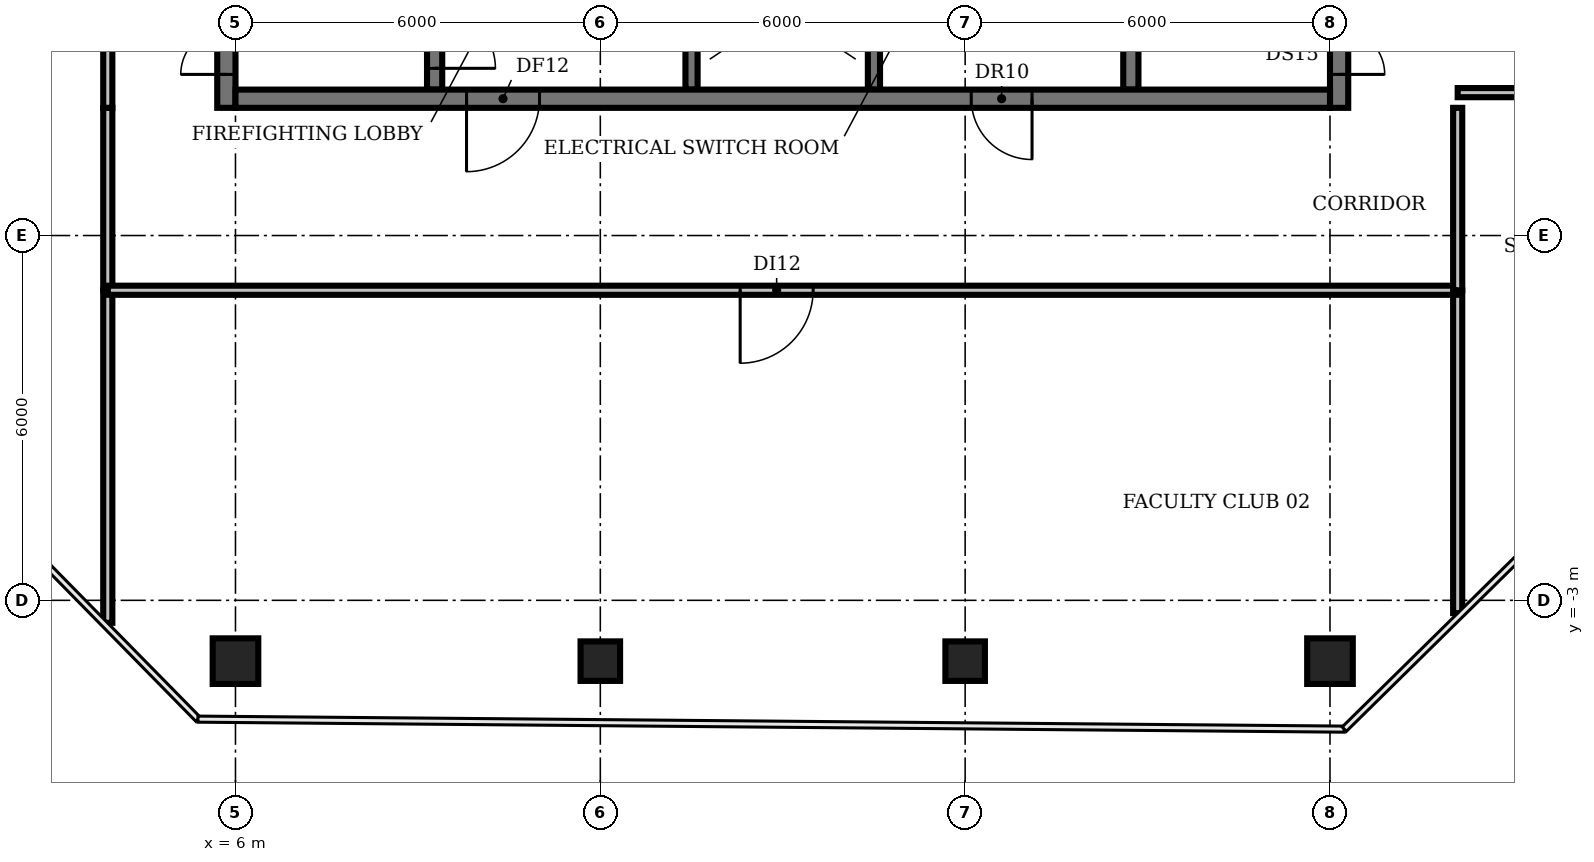
"""IFC4 building model, lengths in metres.
Left out: names, types, materials, properties, quantities, classifications, styles, units other than length and angle.
Written with IfcOpenShell. Run it as: python <this file> out.ifc"""

import sys

from ifc_helpers import new_model, si_unit, direction, frame, frame_2d, origin, origin_2d, place, context, subcontext, project, spatial, rectangle, circle, extrude, element, fill, save


model = new_model("IFC4")
c1 = context("Model", 3, precision=1e-05, world=origin(), true_north=direction((0.0, 1.0)))
c2 = subcontext(c1, "Body", "Model", "MODEL_VIEW")
j1 = project(units=[si_unit("LENGTHUNIT", "METRE"), si_unit("PLANEANGLEUNIT", "RADIAN")], contexts=[c1])
p1 = place(None, origin())
s1 = spatial("IfcSite", under=j1, at=p1, CompositionType="ELEMENT")
p2 = place(p1, origin())
s2 = spatial("IfcBuilding", under=s1, at=p2, CompositionType="ELEMENT")
p3 = place(p2, frame((0.0, 0.0, 335.6)))
s3 = spatial("IfcBuildingStorey", under=s2, at=p3, CompositionType="ELEMENT", Elevation=335.6)
p4 = place(p3, frame((6.0, -4.0, 0.0), z_axis=(0.0, 0.0, 1.0), x_axis=(1.0, 0.0, 0.0)))
e1 = element("IfcColumn", 1, at=p4, inside=s3, PredefinedType="COLUMN", context=c2, shape_type="SweptSolid", body=[
    extrude(circle(Radius=0.375, at=origin_2d()), origin(), (0.0, 0.0, 1.0), 3.9),
])
for number, where, z_axis, x_axis in (
    (2, (12.0, -4.0, 0.0), (0.0, 0.0, 1.0), (1.0, 0.0, 0.0)),
    (3, (18.0, -4.0, 0.0), (0.0, 0.0, 1.0), (1.0, 0.0, 0.0)),
):
    element("IfcColumn", number, at=place(p3, frame(where, z_axis=z_axis, x_axis=x_axis)), inside=s3, PredefinedType="COLUMN", context=c2, shape_type="SweptSolid", body=[
        extrude(rectangle(XDim=0.65, YDim=0.65, at=origin_2d()), origin(), (0.0, 0.0, 1.0), 3.9),
    ])
p5 = place(p3, frame((24.0, -4.0, 0.0), z_axis=(0.0, 0.0, 1.0), x_axis=(1.0, 0.0, 0.0)))
e4 = element("IfcColumn", 4, at=p5, inside=s3, PredefinedType="COLUMN", context=c2, shape_type="SweptSolid", body=[
    extrude(circle(Radius=0.375, at=origin_2d()), origin(), (0.0, 0.0, 1.0), 3.9),
])
p6 = place(p3, frame((9.275, 11.825, 0.0), z_axis=(0.0, 0.0, 1.0), x_axis=(0.0, -1.0, 0.0)))
e5 = element("IfcWall", 5, at=p6, inside=s3, PredefinedType="SHEAR", context=c2, shape_type="SweptSolid", body=[
    extrude(rectangle(XDim=6.425, YDim=0.25, at=frame_2d((3.212, 0.0))), origin(), (0.0, 0.0, 1.0), 3.9),
])
p7 = place(p6, frame((5.075, 0.0, 0.0)))
e6 = element("IfcOpeningElement", 6, at=p7, cuts=e5, PredefinedType="OPENING", context=c2, shape_type="SweptSolid", body=[
    extrude(rectangle(XDim=1.0, YDim=2.1, at=frame_2d((0.5, 1.05))), frame((0.0, 0.135, 0.0), z_axis=(0.0, -1.0, 0.0), x_axis=(1.0, 0.0, 0.0)), (0.0, 0.0, 1.0), 0.27),
])
p8 = place(p3, frame((13.5, 5.4, 0.0), z_axis=(0.0, 0.0, 1.0), x_axis=(0.0, 1.0, 0.0)))
e7 = element("IfcWall", 7, at=p8, inside=s3, PredefinedType="SHEAR", context=c2, shape_type="SweptSolid", body=[
    extrude(rectangle(XDim=8.2, YDim=0.2, at=frame_2d((4.1, 0.0))), origin(), (0.0, 0.0, 1.0), 3.9),
])
p9 = place(p8, frame((0.75, 0.0, 0.0)))
e8 = element("IfcOpeningElement", 8, at=p9, cuts=e7, PredefinedType="OPENING", context=c2, shape_type="SweptSolid", body=[
    extrude(rectangle(XDim=1.1, YDim=2.1, at=frame_2d((0.55, 1.05))), frame((0.0, 0.11, 0.0), z_axis=(0.0, -1.0, 0.0), x_axis=(1.0, 0.0, 0.0)), (0.0, 0.0, 1.0), 0.22),
])
p10 = place(p8, frame((3.55, 0.0, 0.0)))
e9 = element("IfcOpeningElement", 9, at=p10, cuts=e7, PredefinedType="OPENING", context=c2, shape_type="SweptSolid", body=[
    extrude(rectangle(XDim=1.1, YDim=2.1, at=frame_2d((0.55, 1.05))), frame((0.0, 0.11, 0.0), z_axis=(0.0, -1.0, 0.0), x_axis=(1.0, 0.0, 0.0)), (0.0, 0.0, 1.0), 0.22),
])
p11 = place(p8, frame((6.35, 0.0, 0.0)))
e10 = element("IfcOpeningElement", 10, at=p11, cuts=e7, PredefinedType="OPENING", context=c2, shape_type="SweptSolid", body=[
    extrude(rectangle(XDim=1.1, YDim=2.1, at=frame_2d((0.55, 1.05))), frame((0.0, 0.11, 0.0), z_axis=(0.0, -1.0, 0.0), x_axis=(1.0, 0.0, 0.0)), (0.0, 0.0, 1.0), 0.22),
])
p12 = place(p3, frame((16.5, 5.4, 0.0), z_axis=(0.0, 0.0, 1.0), x_axis=(0.0, 1.0, 0.0)))
e11 = element("IfcWall", 11, at=p12, inside=s3, PredefinedType="SHEAR", context=c2, shape_type="SweptSolid", body=[
    extrude(rectangle(XDim=8.2, YDim=0.2, at=frame_2d((4.1, 0.0))), origin(), (0.0, 0.0, 1.0), 3.9),
])
p13 = place(p3, frame((20.725, 5.4, 0.0), z_axis=(0.0, 0.0, 1.0), x_axis=(0.0, 1.0, 0.0)))
e12 = element("IfcWall", 12, at=p13, inside=s3, PredefinedType="SHEAR", context=c2, shape_type="SweptSolid", body=[
    extrude(rectangle(XDim=8.2, YDim=0.25, at=frame_2d((4.1, 0.0))), origin(), (0.0, 0.0, 1.0), 3.9),
])
p14 = place(p3, frame((5.85, 5.1, 0.0), z_axis=(0.0, 0.0, 1.0), x_axis=(0.0, 1.0, 0.0)))
e13 = element("IfcWall", 13, at=p14, inside=s3, PredefinedType="SHEAR", context=c2, shape_type="SweptSolid", body=[
    extrude(rectangle(XDim=20.0, YDim=0.3, at=frame_2d((10.0, 0.0))), origin(), (0.0, 0.0, 1.0), 3.9),
])
p15 = place(p14, frame((0.55, 0.0, 0.0)))
e14 = element("IfcOpeningElement", 14, at=p15, cuts=e13, PredefinedType="OPENING", context=c2, shape_type="SweptSolid", body=[
    extrude(rectangle(XDim=1.5, YDim=2.1, at=frame_2d((0.75, 1.05))), frame((0.0, 0.16, 0.0), z_axis=(0.0, -1.0, 0.0), x_axis=(1.0, 0.0, 0.0)), (0.0, 0.0, 1.0), 0.32),
])
p16 = place(p14, frame((7.0, 0.0, 0.0)))
e15 = element("IfcOpeningElement", 15, at=p16, cuts=e13, PredefinedType="OPENING", context=c2, shape_type="SweptSolid", body=[
    extrude(rectangle(XDim=1.2, YDim=2.1, at=frame_2d((0.6, 1.05))), frame((0.0, 0.16, 0.0), z_axis=(0.0, -1.0, 0.0), x_axis=(1.0, 0.0, 0.0)), (0.0, 0.0, 1.0), 0.32),
])
p17 = place(p14, frame((13.55, 0.0, 0.0)))
e16 = element("IfcOpeningElement", 16, at=p17, cuts=e13, PredefinedType="OPENING", context=c2, shape_type="SweptSolid", body=[
    extrude(rectangle(XDim=1.2, YDim=2.1, at=frame_2d((0.6, 1.05))), frame((0.0, 0.16, 0.0), z_axis=(0.0, -1.0, 0.0), x_axis=(1.0, 0.0, 0.0)), (0.0, 0.0, 1.0), 0.32),
])
p18 = place(p3, frame((24.15, 25.705, 0.0), z_axis=(0.0, 0.0, 1.0), x_axis=(0.0, -1.0, 0.0)))
e17 = element("IfcWall", 17, at=p18, inside=s3, PredefinedType="SHEAR", context=c2, shape_type="SweptSolid", body=[
    extrude(rectangle(XDim=20.605, YDim=0.3, at=frame_2d((10.302, 0.0))), origin(), (0.0, 0.0, 1.0), 3.9),
])
p19 = place(p18, frame((18.555, 0.0, 0.0)))
e18 = element("IfcOpeningElement", 18, at=p19, cuts=e17, PredefinedType="OPENING", context=c2, shape_type="SweptSolid", body=[
    extrude(rectangle(XDim=1.5, YDim=2.1, at=frame_2d((0.75, 1.05))), frame((0.0, 0.16, 0.0), z_axis=(0.0, -1.0, 0.0), x_axis=(1.0, 0.0, 0.0)), (0.0, 0.0, 1.0), 0.32),
])
p20 = place(p18, frame((12.455, 0.0, 0.0)))
e19 = element("IfcOpeningElement", 19, at=p20, cuts=e17, PredefinedType="OPENING", context=c2, shape_type="SweptSolid", body=[
    extrude(rectangle(XDim=0.9, YDim=2.1, at=frame_2d((0.45, 1.05))), frame((0.0, 0.16, 0.0), z_axis=(0.0, -1.0, 0.0), x_axis=(1.0, 0.0, 0.0)), (0.0, 0.0, 1.0), 0.32),
])
p21 = place(p18, frame((6.455, 0.0, 0.0)))
e20 = element("IfcOpeningElement", 20, at=p21, cuts=e17, PredefinedType="OPENING", context=c2, shape_type="SweptSolid", body=[
    extrude(rectangle(XDim=2.0, YDim=2.1, at=frame_2d((1.0, 1.05))), frame((0.0, 0.16, 0.0), z_axis=(0.0, -1.0, 0.0), x_axis=(1.0, 0.0, 0.0)), (0.0, 0.0, 1.0), 0.32),
])
p22 = place(p3, frame((24.0, 5.25, 0.0), z_axis=(0.0, 0.0, 1.0), x_axis=(-1.0, 0.0, 0.0)))
e21 = element("IfcWall", 21, at=p22, inside=s3, PredefinedType="SHEAR", context=c2, shape_type="SweptSolid", body=[
    extrude(rectangle(XDim=18.0, YDim=0.3, at=frame_2d((9.0, 0.0))), origin(), (0.0, 0.0, 1.0), 3.9),
])
p23 = place(p22, frame((13.0, 0.0, 0.0)))
e22 = element("IfcOpeningElement", 22, at=p23, cuts=e21, PredefinedType="OPENING", context=c2, shape_type="SweptSolid", body=[
    extrude(rectangle(XDim=1.2, YDim=2.1, at=frame_2d((0.6, 1.05))), frame((0.0, 0.16, 0.0), z_axis=(0.0, -1.0, 0.0), x_axis=(1.0, 0.0, 0.0)), (0.0, 0.0, 1.0), 0.32),
])
p24 = place(p22, frame((4.9, 0.0, 0.0)))
e23 = element("IfcOpeningElement", 23, at=p24, cuts=e21, PredefinedType="OPENING", context=c2, shape_type="SweptSolid", body=[
    extrude(rectangle(XDim=1.0, YDim=2.1, at=frame_2d((0.5, 1.05))), frame((0.0, 0.16, 0.0), z_axis=(0.0, -1.0, 0.0), x_axis=(1.0, 0.0, 0.0)), (0.0, 0.0, 1.0), 0.32),
])
p25 = place(p3, frame((3.9, -3.37, 0.0), z_axis=(0.0, 0.0, 1.0), x_axis=(0.0, 1.0, 0.0)))
e24 = element("IfcWall", 24, at=p25, inside=s3, PredefinedType="PARTITIONING", context=c2, shape_type="SweptSolid", body=[
    extrude(rectangle(XDim=5.47, YDim=0.15, at=frame_2d((2.735, 0.0))), origin(), (0.0, 0.0, 1.0), 2.95),
])
p26 = place(p3, frame((3.9, 2.1, 0.0), z_axis=(0.0, 0.0, 1.0), x_axis=(0.0, 1.0, 0.0)))
e25 = element("IfcWall", 25, at=p26, inside=s3, PredefinedType="PARTITIONING", context=c2, shape_type="SweptSolid", body=[
    extrude(rectangle(XDim=3.0, YDim=0.15, at=frame_2d((1.5, 0.0))), origin(), (0.0, 0.0, 1.0), 2.95),
])
p27 = place(p3, frame((3.9, 5.1, 0.0), z_axis=(0.0, 0.0, 1.0), x_axis=(0.0, 1.0, 0.0)))
e26 = element("IfcWall", 26, at=p27, inside=s3, PredefinedType="PARTITIONING", context=c2, shape_type="SweptSolid", body=[
    extrude(rectangle(XDim=13.9, YDim=0.15, at=frame_2d((6.95, 0.0))), origin(), (0.0, 0.0, 1.0), 2.95),
])
p28 = place(p27, frame((6.2, 0.0, 0.0)))
e27 = element("IfcOpeningElement", 27, at=p28, cuts=e26, PredefinedType="OPENING", context=c2, shape_type="SweptSolid", body=[
    extrude(rectangle(XDim=1.2, YDim=2.1, at=frame_2d((0.6, 1.05))), frame((0.0, 0.085, 0.0), z_axis=(0.0, -1.0, 0.0), x_axis=(1.0, 0.0, 0.0)), (0.0, 0.0, 1.0), 0.17),
])
p29 = place(p3, frame((26.1, -3.21, 0.0), z_axis=(0.0, 0.0, 1.0), x_axis=(0.0, 1.0, 0.0)))
e28 = element("IfcWall", 28, at=p29, inside=s3, PredefinedType="PARTITIONING", context=c2, shape_type="SweptSolid", body=[
    extrude(rectangle(XDim=5.31, YDim=0.15, at=frame_2d((2.655, 0.0))), origin(), (0.0, 0.0, 1.0), 2.95),
])
p30 = place(p3, frame((26.1, 2.1, 0.0), z_axis=(0.0, 0.0, 1.0), x_axis=(-1.0, 0.0, 0.0)))
e29 = element("IfcWall", 29, at=p30, inside=s3, PredefinedType="PARTITIONING", context=c2, shape_type="SweptSolid", body=[
    extrude(rectangle(XDim=22.2, YDim=0.15, at=frame_2d((11.1, 0.0))), origin(), (0.0, 0.0, 1.0), 2.95),
])
p31 = place(p30, frame((10.6, 0.0, 0.0)))
e30 = element("IfcOpeningElement", 30, at=p31, cuts=e29, PredefinedType="OPENING", context=c2, shape_type="SweptSolid", body=[
    extrude(rectangle(XDim=1.2, YDim=2.1, at=frame_2d((0.6, 1.05))), frame((0.0, 0.085, 0.0), z_axis=(0.0, -1.0, 0.0), x_axis=(1.0, 0.0, 0.0)), (0.0, 0.0, 1.0), 0.17),
])
p32 = place(p3, frame((26.1, 2.1, 0.0), z_axis=(0.0, 0.0, 1.0), x_axis=(0.0, 1.0, 0.0)))
e31 = element("IfcWall", 31, at=p32, inside=s3, PredefinedType="PARTITIONING", context=c2, shape_type="SweptSolid", body=[
    extrude(rectangle(XDim=3.0, YDim=0.15, at=frame_2d((1.5, 0.0))), origin(), (0.0, 0.0, 1.0), 2.95),
])
p33 = place(p3, frame((30.98, 5.35, 0.0), z_axis=(0.0, 0.0, 1.0), x_axis=(-1.0, 0.0, 0.0)))
e32 = element("IfcWall", 32, at=p33, inside=s3, PredefinedType="PARTITIONING", context=c2, shape_type="SweptSolid", body=[
    extrude(rectangle(XDim=4.88, YDim=0.15, at=frame_2d((2.44, 0.0))), origin(), (0.0, 0.0, 1.0), 2.95),
])
p34 = place(p33, frame((2.18, 0.0, 0.0)))
e33 = element("IfcOpeningElement", 33, at=p34, cuts=e32, PredefinedType="OPENING", context=c2, shape_type="SweptSolid", body=[
    extrude(rectangle(XDim=1.0, YDim=2.1, at=frame_2d((0.5, 1.05))), frame((0.0, 0.085, 0.0), z_axis=(0.0, -1.0, 0.0), x_axis=(1.0, 0.0, 0.0)), (0.0, 0.0, 1.0), 0.17),
])
p35 = place(p7, origin())
e34 = element("IfcDoor", 34, at=p35, inside=s3, OperationType="SINGLE_SWING_RIGHT", PredefinedType="DOOR", context=c2, shape_type="SweptSolid", body=[
    extrude(rectangle(XDim=1.0, YDim=2.1, at=frame_2d((0.5, 1.05))), frame((0.0, 0.025, 0.0), z_axis=(0.0, -1.0, 0.0), x_axis=(1.0, 0.0, 0.0)), (0.0, 0.0, 1.0), 0.05),
])
fill(e6, e34)
p36 = place(p15, origin())
e35 = element("IfcDoor", 35, at=p36, inside=s3, OperationType="DOUBLE_DOOR_SINGLE_SWING", PredefinedType="DOOR", context=c2, shape_type="SweptSolid", body=[
    extrude(rectangle(XDim=1.5, YDim=2.1, at=frame_2d((0.75, 1.05))), frame((0.0, 0.025, 0.0), z_axis=(0.0, -1.0, 0.0), x_axis=(1.0, 0.0, 0.0)), (0.0, 0.0, 1.0), 0.05),
])
fill(e14, e35)
p37 = place(p19, origin())
e36 = element("IfcDoor", 36, at=p37, inside=s3, OperationType="DOUBLE_DOOR_SINGLE_SWING", PredefinedType="DOOR", context=c2, shape_type="SweptSolid", body=[
    extrude(rectangle(XDim=1.5, YDim=2.1, at=frame_2d((0.75, 1.05))), frame((0.0, 0.025, 0.0), z_axis=(0.0, -1.0, 0.0), x_axis=(1.0, 0.0, 0.0)), (0.0, 0.0, 1.0), 0.05),
])
fill(e18, e36)
p38 = place(p23, origin())
e37 = element("IfcDoor", 37, at=p38, inside=s3, OperationType="SINGLE_SWING_RIGHT", PredefinedType="DOOR", context=c2, shape_type="SweptSolid", body=[
    extrude(rectangle(XDim=1.2, YDim=2.1, at=frame_2d((0.6, 1.05))), frame((0.0, 0.025, 0.0), z_axis=(0.0, -1.0, 0.0), x_axis=(1.0, 0.0, 0.0)), (0.0, 0.0, 1.0), 0.05),
])
fill(e22, e37)
p39 = place(p24, origin())
e38 = element("IfcDoor", 38, at=p39, inside=s3, OperationType="SINGLE_SWING_LEFT", PredefinedType="DOOR", context=c2, shape_type="SweptSolid", body=[
    extrude(rectangle(XDim=1.0, YDim=2.1, at=frame_2d((0.5, 1.05))), frame((0.0, 0.025, 0.0), z_axis=(0.0, -1.0, 0.0), x_axis=(1.0, 0.0, 0.0)), (0.0, 0.0, 1.0), 0.05),
])
fill(e23, e38)
p40 = place(p31, origin())
e39 = element("IfcDoor", 39, at=p40, inside=s3, OperationType="SINGLE_SWING_RIGHT", PredefinedType="DOOR", context=c2, shape_type="SweptSolid", body=[
    extrude(rectangle(XDim=1.2, YDim=2.1, at=frame_2d((0.6, 1.05))), frame((0.0, 0.025, 0.0), z_axis=(0.0, -1.0, 0.0), x_axis=(1.0, 0.0, 0.0)), (0.0, 0.0, 1.0), 0.05),
])
fill(e30, e39)
save(model, sys.argv[1])
